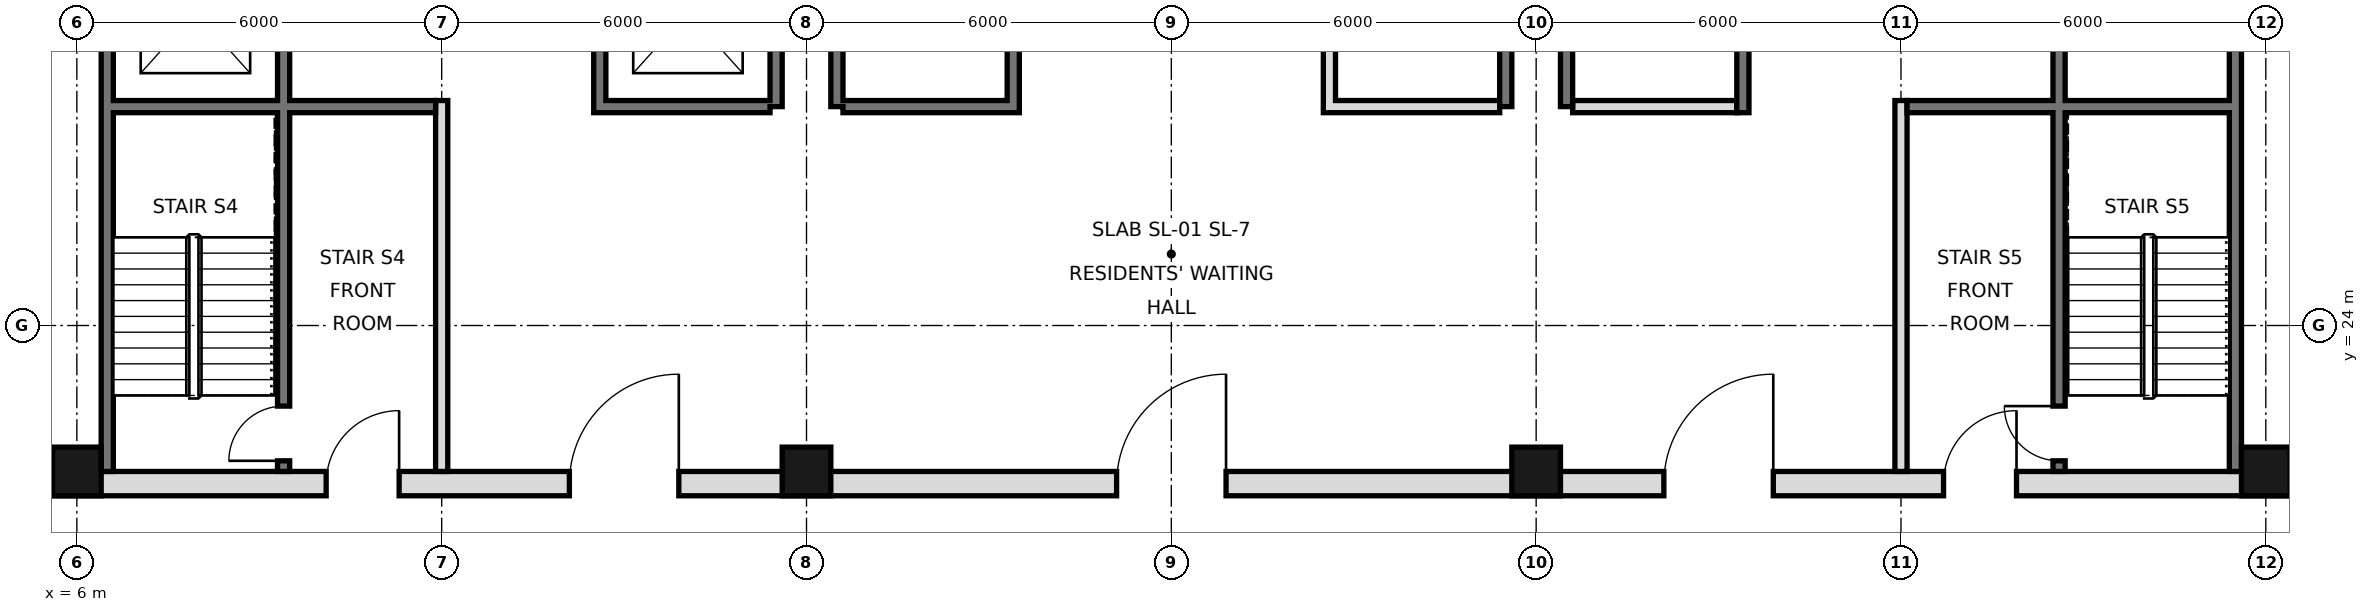
"""IFC4 building model, lengths in metres.
Left out: names, types, materials, properties, quantities, classifications, styles, units other than length and angle.
Written with IfcOpenShell. Run it as: python <this file> out.ifc"""

import sys

from ifc_helpers import new_model, si_unit, direction, frame, frame_2d, origin, origin_2d, place, context, subcontext, project, spatial, rectangle, hollow_rectangle, extrude, element, fill, save


model = new_model("IFC4")
c1 = context("Model", 3, precision=1e-05, world=origin(), true_north=direction((0.0, 1.0)))
c2 = subcontext(c1, "Body", "Model", "MODEL_VIEW")
j1 = project(units=[si_unit("LENGTHUNIT", "METRE"), si_unit("PLANEANGLEUNIT", "RADIAN")], contexts=[c1])
p1 = place(None, origin())
s1 = spatial("IfcSite", under=j1, at=p1, CompositionType="ELEMENT")
p2 = place(p1, origin())
s2 = spatial("IfcBuilding", under=s1, at=p2, CompositionType="ELEMENT")
p3 = place(p2, frame((0.0, 0.0, 110.6)))
s3 = spatial("IfcBuildingStorey", under=s2, at=p3, CompositionType="ELEMENT", Elevation=110.6)
for number, where, z_axis, x_axis in (
    (1, (6.0, 21.6, 0.0), (0.0, 0.0, 1.0), (1.0, 0.0, 0.0)),
    (2, (18.0, 21.6, 0.0), (0.0, 0.0, 1.0), (1.0, 0.0, 0.0)),
    (3, (30.0, 21.6, 0.0), (0.0, 0.0, 1.0), (1.0, 0.0, 0.0)),
    (4, (42.0, 21.6, 0.0), (0.0, 0.0, 1.0), (1.0, 0.0, 0.0)),
):
    element("IfcColumn", number, at=place(p3, frame(where, z_axis=z_axis, x_axis=x_axis)), inside=s3, PredefinedType="COLUMN", context=c2, shape_type="SweptSolid", body=[
        extrude(hollow_rectangle(XDim=0.8, YDim=0.8, WallThickness=0.05, at=origin_2d()), origin(), (0.0, 0.0, 1.0), 3.6),
    ])
for number, where, z_axis, x_axis in (
    (5, (6.5, 21.6, 0.0), (0.0, 0.0, 1.0), (0.0, 1.0, 0.0)),
    (6, (41.5, 21.6, 0.0), (0.0, 0.0, 1.0), (0.0, 1.0, 0.0)),
):
    element("IfcWall", number, at=place(p3, frame(where, z_axis=z_axis, x_axis=x_axis)), inside=s3, PredefinedType="SOLIDWALL", context=c2, shape_type="SweptSolid", body=[
        extrude(rectangle(XDim=23.5, YDim=0.2, at=frame_2d((11.75, 0.0))), origin(), (0.0, 0.0, 1.0), 3.38),
    ])
for number, where, z_axis, x_axis in (
    (7, (17.5, 27.6, 0.0), (0.0, 0.0, 1.0), (0.0, 1.0, 0.0)),
    (8, (18.5, 27.6, 0.0), (0.0, 0.0, 1.0), (0.0, 1.0, 0.0)),
    (9, (29.5, 27.6, 0.0), (0.0, 0.0, 1.0), (0.0, 1.0, 0.0)),
    (10, (30.5, 27.6, 0.0), (0.0, 0.0, 1.0), (0.0, 1.0, 0.0)),
):
    element("IfcWall", number, at=place(p3, frame(where, z_axis=z_axis, x_axis=x_axis)), inside=s3, PredefinedType="SOLIDWALL", context=c2, shape_type="SweptSolid", body=[
        extrude(rectangle(XDim=17.5, YDim=0.2, at=frame_2d((8.75, 0.0))), origin(), (0.0, 0.0, 1.0), 3.38),
    ])
p4 = place(p3, frame((5.6, 21.4, 0.0), z_axis=(0.0, 0.0, 1.0), x_axis=(1.0, 0.0, 0.0)))
e11 = element("IfcWall", 11, at=p4, inside=s3, PredefinedType="SOLIDWALL", context=c2, shape_type="SweptSolid", body=[
    extrude(rectangle(XDim=36.8, YDim=0.4, at=frame_2d((18.4, 0.0))), origin(), (0.0, 0.0, 1.0), 3.38),
])
p5 = place(p4, frame((8.5, 0.0, 0.0)))
e12 = element("IfcOpeningElement", 12, at=p5, cuts=e11, PredefinedType="OPENING", context=c2, shape_type="SweptSolid", body=[
    extrude(rectangle(XDim=1.8, YDim=2.1, at=frame_2d((0.9, 1.05))), frame((0.0, 0.21, 0.0), z_axis=(0.0, -1.0, 0.0), x_axis=(1.0, 0.0, 0.0)), (0.0, 0.0, 1.0), 0.42),
])
p6 = place(p4, frame((17.5, 0.0, 0.0)))
e13 = element("IfcOpeningElement", 13, at=p6, cuts=e11, PredefinedType="OPENING", context=c2, shape_type="SweptSolid", body=[
    extrude(rectangle(XDim=1.8, YDim=2.1, at=frame_2d((0.9, 1.05))), frame((0.0, 0.21, 0.0), z_axis=(0.0, -1.0, 0.0), x_axis=(1.0, 0.0, 0.0)), (0.0, 0.0, 1.0), 0.42),
])
p7 = place(p4, frame((26.5, 0.0, 0.0)))
e14 = element("IfcOpeningElement", 14, at=p7, cuts=e11, PredefinedType="OPENING", context=c2, shape_type="SweptSolid", body=[
    extrude(rectangle(XDim=1.8, YDim=2.1, at=frame_2d((0.9, 1.05))), frame((0.0, 0.21, 0.0), z_axis=(0.0, -1.0, 0.0), x_axis=(1.0, 0.0, 0.0)), (0.0, 0.0, 1.0), 0.42),
])
p8 = place(p4, frame((4.5, 0.0, 0.0)))
e15 = element("IfcOpeningElement", 15, at=p8, cuts=e11, PredefinedType="OPENING", context=c2, shape_type="SweptSolid", body=[
    extrude(rectangle(XDim=1.2, YDim=2.1, at=frame_2d((0.6, 1.05))), frame((0.0, 0.21, 0.0), z_axis=(0.0, -1.0, 0.0), x_axis=(1.0, 0.0, 0.0)), (0.0, 0.0, 1.0), 0.42),
])
p9 = place(p4, frame((31.1, 0.0, 0.0)))
e16 = element("IfcOpeningElement", 16, at=p9, cuts=e11, PredefinedType="OPENING", context=c2, shape_type="SweptSolid", body=[
    extrude(rectangle(XDim=1.2, YDim=2.1, at=frame_2d((0.6, 1.05))), frame((0.0, 0.21, 0.0), z_axis=(0.0, -1.0, 0.0), x_axis=(1.0, 0.0, 0.0)), (0.0, 0.0, 1.0), 0.42),
])
p10 = place(p3, frame((12.0, 21.6, 0.0), z_axis=(0.0, 0.0, 1.0), x_axis=(0.0, 1.0, 0.0)))
e17 = element("IfcWall", 17, at=p10, inside=s3, PredefinedType="PARTITIONING", context=c2, shape_type="SweptSolid", body=[
    extrude(rectangle(XDim=6.1, YDim=0.2, at=frame_2d((3.05, 0.0))), origin(), (0.0, 0.0, 1.0), 3.38),
])
p11 = place(p3, frame((14.6, 27.5, 0.0), z_axis=(0.0, 0.0, 1.0), x_axis=(0.0, 1.0, 0.0)))
e18 = element("IfcWall", 18, at=p11, inside=s3, PredefinedType="SOLIDWALL", context=c2, shape_type="SweptSolid", body=[
    extrude(rectangle(XDim=17.5, YDim=0.2, at=frame_2d((8.75, 0.0))), origin(), (0.0, 0.0, 1.0), 3.38),
])
p12 = place(p11, frame((1.1, 0.0, 0.0)))
e19 = element("IfcOpeningElement", 19, at=p12, cuts=e18, PredefinedType="OPENING", context=c2, shape_type="SweptSolid", body=[
    extrude(rectangle(XDim=1.1, YDim=2.1, at=frame_2d((0.55, 1.05))), frame((0.0, 0.11, 0.0), z_axis=(0.0, -1.0, 0.0), x_axis=(1.0, 0.0, 0.0)), (0.0, 0.0, 1.0), 0.22),
])
p13 = place(p11, frame((4.2, 0.0, 0.0)))
e20 = element("IfcOpeningElement", 20, at=p13, cuts=e18, PredefinedType="OPENING", context=c2, shape_type="SweptSolid", body=[
    extrude(rectangle(XDim=1.1, YDim=2.1, at=frame_2d((0.55, 1.05))), frame((0.0, 0.11, 0.0), z_axis=(0.0, -1.0, 0.0), x_axis=(1.0, 0.0, 0.0)), (0.0, 0.0, 1.0), 0.22),
])
p14 = place(p11, frame((15.4, 0.0, 0.0)))
e21 = element("IfcOpeningElement", 21, at=p14, cuts=e18, PredefinedType="OPENING", context=c2, shape_type="SweptSolid", body=[
    extrude(rectangle(XDim=1.1, YDim=2.1, at=frame_2d((0.55, 1.05))), frame((0.0, 0.11, 0.0), z_axis=(0.0, -1.0, 0.0), x_axis=(1.0, 0.0, 0.0)), (0.0, 0.0, 1.0), 0.22),
])
p15 = place(p11, frame((9.9, 0.0, 0.0)))
e22 = element("IfcOpeningElement", 22, at=p15, cuts=e18, PredefinedType="OPENING", context=c2, shape_type="SweptSolid", body=[
    extrude(rectangle(XDim=0.9, YDim=2.1, at=frame_2d((0.45, 1.05))), frame((0.0, 0.11, 0.0), z_axis=(0.0, -1.0, 0.0), x_axis=(1.0, 0.0, 0.0)), (0.0, 0.0, 1.0), 0.22),
])
p16 = place(p3, frame((21.4, 27.5, 0.0), z_axis=(0.0, 0.0, 1.0), x_axis=(0.0, 1.0, 0.0)))
e23 = element("IfcWall", 23, at=p16, inside=s3, PredefinedType="SOLIDWALL", context=c2, shape_type="SweptSolid", body=[
    extrude(rectangle(XDim=17.5, YDim=0.2, at=frame_2d((8.75, 0.0))), origin(), (0.0, 0.0, 1.0), 3.38),
])
p17 = place(p16, frame((16.2, 0.0, 0.0)))
e24 = element("IfcOpeningElement", 24, at=p17, cuts=e23, PredefinedType="OPENING", context=c2, shape_type="SweptSolid", body=[
    extrude(rectangle(XDim=1.0, YDim=2.1, at=frame_2d((0.5, 1.05))), frame((0.0, 0.11, 0.0), z_axis=(0.0, -1.0, 0.0), x_axis=(1.0, 0.0, 0.0)), (0.0, 0.0, 1.0), 0.22),
])
p18 = place(p16, frame((7.4, 0.0, 0.0)))
e25 = element("IfcOpeningElement", 25, at=p18, cuts=e23, PredefinedType="OPENING", context=c2, shape_type="SweptSolid", body=[
    extrude(rectangle(XDim=0.9, YDim=2.1, at=frame_2d((0.45, 1.05))), frame((0.0, 0.11, 0.0), z_axis=(0.0, -1.0, 0.0), x_axis=(1.0, 0.0, 0.0)), (0.0, 0.0, 1.0), 0.22),
])
p19 = place(p3, frame((26.6, 27.5, 0.0), z_axis=(0.0, 0.0, 1.0), x_axis=(0.0, 1.0, 0.0)))
e26 = element("IfcWall", 26, at=p19, inside=s3, PredefinedType="SOLIDWALL", context=c2, shape_type="SweptSolid", body=[
    extrude(rectangle(XDim=17.5, YDim=0.2, at=frame_2d((8.75, 0.0))), origin(), (0.0, 0.0, 1.0), 3.38),
])
p20 = place(p19, frame((4.3, 0.0, 0.0)))
e27 = element("IfcOpeningElement", 27, at=p20, cuts=e26, PredefinedType="OPENING", context=c2, shape_type="SweptSolid", body=[
    extrude(rectangle(XDim=0.9, YDim=2.1, at=frame_2d((0.45, 1.05))), frame((0.0, 0.11, 0.0), z_axis=(0.0, -1.0, 0.0), x_axis=(1.0, 0.0, 0.0)), (0.0, 0.0, 1.0), 0.22),
])
p21 = place(p19, frame((10.35, 0.0, 0.0)))
e28 = element("IfcOpeningElement", 28, at=p21, cuts=e26, PredefinedType="OPENING", context=c2, shape_type="SweptSolid", body=[
    extrude(rectangle(XDim=1.0, YDim=2.1, at=frame_2d((0.5, 1.05))), frame((0.0, 0.11, 0.0), z_axis=(0.0, -1.0, 0.0), x_axis=(1.0, 0.0, 0.0)), (0.0, 0.0, 1.0), 0.22),
])
p22 = place(p19, frame((14.575, 0.0, 0.0)))
e29 = element("IfcOpeningElement", 29, at=p22, cuts=e26, PredefinedType="OPENING", context=c2, shape_type="SweptSolid", body=[
    extrude(rectangle(XDim=1.0, YDim=2.1, at=frame_2d((0.5, 1.05))), frame((0.0, 0.11, 0.0), z_axis=(0.0, -1.0, 0.0), x_axis=(1.0, 0.0, 0.0)), (0.0, 0.0, 1.0), 0.22),
])
p23 = place(p3, frame((33.4, 27.5, 0.0), z_axis=(0.0, 0.0, 1.0), x_axis=(0.0, 1.0, 0.0)))
e30 = element("IfcWall", 30, at=p23, inside=s3, PredefinedType="SOLIDWALL", context=c2, shape_type="SweptSolid", body=[
    extrude(rectangle(XDim=17.5, YDim=0.2, at=frame_2d((8.75, 0.0))), origin(), (0.0, 0.0, 1.0), 3.38),
])
p24 = place(p23, frame((15.4, 0.0, 0.0)))
e31 = element("IfcOpeningElement", 31, at=p24, cuts=e30, PredefinedType="OPENING", context=c2, shape_type="SweptSolid", body=[
    extrude(rectangle(XDim=1.1, YDim=2.1, at=frame_2d((0.55, 1.05))), frame((0.0, 0.11, 0.0), z_axis=(0.0, -1.0, 0.0), x_axis=(1.0, 0.0, 0.0)), (0.0, 0.0, 1.0), 0.22),
])
p25 = place(p23, frame((2.7, 0.0, 0.0)))
e32 = element("IfcOpeningElement", 32, at=p25, cuts=e30, PredefinedType="OPENING", context=c2, shape_type="SweptSolid", body=[
    extrude(rectangle(XDim=1.0, YDim=2.1, at=frame_2d((0.5, 1.05))), frame((0.0, 0.11, 0.0), z_axis=(0.0, -1.0, 0.0), x_axis=(1.0, 0.0, 0.0)), (0.0, 0.0, 1.0), 0.22),
])
p26 = place(p23, frame((9.9, 0.0, 0.0)))
e33 = element("IfcOpeningElement", 33, at=p26, cuts=e30, PredefinedType="OPENING", context=c2, shape_type="SweptSolid", body=[
    extrude(rectangle(XDim=0.9, YDim=2.1, at=frame_2d((0.45, 1.05))), frame((0.0, 0.11, 0.0), z_axis=(0.0, -1.0, 0.0), x_axis=(1.0, 0.0, 0.0)), (0.0, 0.0, 1.0), 0.22),
])
p27 = place(p3, frame((36.0, 21.6, 0.0), z_axis=(0.0, 0.0, 1.0), x_axis=(0.0, 1.0, 0.0)))
e34 = element("IfcWall", 34, at=p27, inside=s3, PredefinedType="PARTITIONING", context=c2, shape_type="SweptSolid", body=[
    extrude(rectangle(XDim=6.1, YDim=0.2, at=frame_2d((3.05, 0.0))), origin(), (0.0, 0.0, 1.0), 3.38),
])
p28 = place(p3, frame((38.6, 21.6, 0.0), z_axis=(0.0, 0.0, 1.0), x_axis=(0.0, 1.0, 0.0)))
e35 = element("IfcWall", 35, at=p28, inside=s3, PredefinedType="SOLIDWALL", context=c2, shape_type="SweptSolid", body=[
    extrude(rectangle(XDim=23.4, YDim=0.2, at=frame_2d((11.7, 0.0))), origin(), (0.0, 0.0, 1.0), 3.38),
])
p29 = place(p28, frame((8.6, 0.0, 0.0)))
e36 = element("IfcOpeningElement", 36, at=p29, cuts=e35, PredefinedType="OPENING", context=c2, shape_type="SweptSolid", body=[
    extrude(rectangle(XDim=1.0, YDim=2.1, at=frame_2d((0.5, 1.05))), frame((0.0, 0.11, 0.0), z_axis=(0.0, -1.0, 0.0), x_axis=(1.0, 0.0, 0.0)), (0.0, 0.0, 1.0), 0.22),
])
p30 = place(p28, frame((13.25, 0.0, 0.0)))
e37 = element("IfcOpeningElement", 37, at=p30, cuts=e35, PredefinedType="OPENING", context=c2, shape_type="SweptSolid", body=[
    extrude(rectangle(XDim=1.0, YDim=2.1, at=frame_2d((0.5, 1.05))), frame((0.0, 0.11, 0.0), z_axis=(0.0, -1.0, 0.0), x_axis=(1.0, 0.0, 0.0)), (0.0, 0.0, 1.0), 0.22),
])
p31 = place(p28, frame((22.1, 0.0, 0.0)))
e38 = element("IfcOpeningElement", 38, at=p31, cuts=e35, PredefinedType="OPENING", context=c2, shape_type="SweptSolid", body=[
    extrude(rectangle(XDim=1.0, YDim=2.1, at=frame_2d((0.5, 1.05))), frame((0.0, 0.11, 0.0), z_axis=(0.0, -1.0, 0.0), x_axis=(1.0, 0.0, 0.0)), (0.0, 0.0, 1.0), 0.22),
])
p32 = place(p28, frame((0.175, 0.0, 0.0)))
e39 = element("IfcOpeningElement", 39, at=p32, cuts=e35, PredefinedType="OPENING", context=c2, shape_type="SweptSolid", body=[
    extrude(rectangle(XDim=0.9, YDim=2.1, at=frame_2d((0.45, 1.05))), frame((0.0, 0.11, 0.0), z_axis=(0.0, -1.0, 0.0), x_axis=(1.0, 0.0, 0.0)), (0.0, 0.0, 1.0), 0.22),
])
p33 = place(p3, frame((9.4, 21.6, 0.0), z_axis=(0.0, 0.0, 1.0), x_axis=(0.0, 1.0, 0.0)))
e40 = element("IfcWall", 40, at=p33, inside=s3, PredefinedType="SOLIDWALL", context=c2, shape_type="SweptSolid", body=[
    extrude(rectangle(XDim=23.4, YDim=0.2, at=frame_2d((11.7, 0.0))), origin(), (0.0, 0.0, 1.0), 3.38),
])
p34 = place(p33, frame((7.0, 0.0, 0.0)))
e41 = element("IfcOpeningElement", 41, at=p34, cuts=e40, PredefinedType="OPENING", context=c2, shape_type="SweptSolid", body=[
    extrude(rectangle(XDim=1.1, YDim=2.1, at=frame_2d((0.55, 1.05))), frame((0.0, 0.11, 0.0), z_axis=(0.0, -1.0, 0.0), x_axis=(1.0, 0.0, 0.0)), (0.0, 0.0, 1.0), 0.22),
])
p35 = place(p33, frame((10.1, 0.0, 0.0)))
e42 = element("IfcOpeningElement", 42, at=p35, cuts=e40, PredefinedType="OPENING", context=c2, shape_type="SweptSolid", body=[
    extrude(rectangle(XDim=1.1, YDim=2.1, at=frame_2d((0.55, 1.05))), frame((0.0, 0.11, 0.0), z_axis=(0.0, -1.0, 0.0), x_axis=(1.0, 0.0, 0.0)), (0.0, 0.0, 1.0), 0.22),
])
p36 = place(p33, frame((13.2, 0.0, 0.0)))
e43 = element("IfcOpeningElement", 43, at=p36, cuts=e40, PredefinedType="OPENING", context=c2, shape_type="SweptSolid", body=[
    extrude(rectangle(XDim=1.1, YDim=2.1, at=frame_2d((0.55, 1.05))), frame((0.0, 0.11, 0.0), z_axis=(0.0, -1.0, 0.0), x_axis=(1.0, 0.0, 0.0)), (0.0, 0.0, 1.0), 0.22),
])
p37 = place(p33, frame((22.1, 0.0, 0.0)))
e44 = element("IfcOpeningElement", 44, at=p37, cuts=e40, PredefinedType="OPENING", context=c2, shape_type="SweptSolid", body=[
    extrude(rectangle(XDim=1.0, YDim=2.1, at=frame_2d((0.5, 1.05))), frame((0.0, 0.11, 0.0), z_axis=(0.0, -1.0, 0.0), x_axis=(1.0, 0.0, 0.0)), (0.0, 0.0, 1.0), 0.22),
])
p38 = place(p33, frame((0.175, 0.0, 0.0)))
e45 = element("IfcOpeningElement", 45, at=p38, cuts=e40, PredefinedType="OPENING", context=c2, shape_type="SweptSolid", body=[
    extrude(rectangle(XDim=0.9, YDim=2.1, at=frame_2d((0.45, 1.05))), frame((0.0, 0.11, 0.0), z_axis=(0.0, -1.0, 0.0), x_axis=(1.0, 0.0, 0.0)), (0.0, 0.0, 1.0), 0.22),
])
for number, where, z_axis, x_axis in (
    (46, (14.7, 27.6, 0.0), (0.0, 0.0, 1.0), (1.0, 0.0, 0.0)),
    (47, (18.6, 27.6, 0.0), (0.0, 0.0, 1.0), (1.0, 0.0, 0.0)),
    (48, (26.7, 27.6, 0.0), (0.0, 0.0, 1.0), (1.0, 0.0, 0.0)),
):
    element("IfcWall", number, at=place(p3, frame(where, z_axis=z_axis, x_axis=x_axis)), inside=s3, PredefinedType="SOLIDWALL", context=c2, shape_type="SweptSolid", body=[
        extrude(rectangle(XDim=2.7, YDim=0.2, at=frame_2d((1.35, 0.0))), origin(), (0.0, 0.0, 1.0), 3.38),
    ])
p39 = place(p3, frame((30.6, 27.6, 0.0), z_axis=(0.0, 0.0, 1.0), x_axis=(1.0, 0.0, 0.0)))
e49 = element("IfcWall", 49, at=p39, inside=s3, PredefinedType="PARTITIONING", context=c2, shape_type="SweptSolid", body=[
    extrude(rectangle(XDim=2.7, YDim=0.2, at=frame_2d((1.35, 0.0))), origin(), (0.0, 0.0, 1.0), 3.38),
])
for number, where, z_axis, x_axis in (
    (50, (36.1, 27.6, 0.0), (0.0, 0.0, 1.0), (1.0, 0.0, 0.0)),
    (51, (6.6, 27.6, 0.0), (0.0, 0.0, 1.0), (1.0, 0.0, 0.0)),
):
    element("IfcWall", number, at=place(p3, frame(where, z_axis=z_axis, x_axis=x_axis)), inside=s3, PredefinedType="SOLIDWALL", context=c2, shape_type="SweptSolid", body=[
        extrude(rectangle(XDim=5.3, YDim=0.2, at=frame_2d((2.65, 0.0))), origin(), (0.0, 0.0, 1.0), 3.38),
    ])
p40 = place(p5, frame((1.8, 0.0, 0.0), z_axis=(0.0, 0.0, 1.0), x_axis=(-1.0, 0.0, 0.0)))
e52 = element("IfcDoor", 52, at=p40, inside=s3, OperationType="SINGLE_SWING_LEFT", PredefinedType="DOOR", context=c2, shape_type="SweptSolid", body=[
    extrude(rectangle(XDim=1.8, YDim=2.1, at=frame_2d((0.9, 1.05))), frame((0.0, 0.025, 0.0), z_axis=(0.0, -1.0, 0.0), x_axis=(1.0, 0.0, 0.0)), (0.0, 0.0, 1.0), 0.05),
])
fill(e12, e52)
p41 = place(p6, frame((1.8, 0.0, 0.0), z_axis=(0.0, 0.0, 1.0), x_axis=(-1.0, 0.0, 0.0)))
e53 = element("IfcDoor", 53, at=p41, inside=s3, OperationType="SINGLE_SWING_LEFT", PredefinedType="DOOR", context=c2, shape_type="SweptSolid", body=[
    extrude(rectangle(XDim=1.8, YDim=2.1, at=frame_2d((0.9, 1.05))), frame((0.0, 0.025, 0.0), z_axis=(0.0, -1.0, 0.0), x_axis=(1.0, 0.0, 0.0)), (0.0, 0.0, 1.0), 0.05),
])
fill(e13, e53)
p42 = place(p7, frame((1.8, 0.0, 0.0), z_axis=(0.0, 0.0, 1.0), x_axis=(-1.0, 0.0, 0.0)))
e54 = element("IfcDoor", 54, at=p42, inside=s3, OperationType="SINGLE_SWING_LEFT", PredefinedType="DOOR", context=c2, shape_type="SweptSolid", body=[
    extrude(rectangle(XDim=1.8, YDim=2.1, at=frame_2d((0.9, 1.05))), frame((0.0, 0.025, 0.0), z_axis=(0.0, -1.0, 0.0), x_axis=(1.0, 0.0, 0.0)), (0.0, 0.0, 1.0), 0.05),
])
fill(e14, e54)
p43 = place(p8, frame((1.2, 0.0, 0.0), z_axis=(0.0, 0.0, 1.0), x_axis=(-1.0, 0.0, 0.0)))
e55 = element("IfcDoor", 55, at=p43, inside=s3, OperationType="SINGLE_SWING_LEFT", PredefinedType="DOOR", context=c2, shape_type="SweptSolid", body=[
    extrude(rectangle(XDim=1.2, YDim=2.1, at=frame_2d((0.6, 1.05))), frame((0.0, 0.025, 0.0), z_axis=(0.0, -1.0, 0.0), x_axis=(1.0, 0.0, 0.0)), (0.0, 0.0, 1.0), 0.05),
])
fill(e15, e55)
p44 = place(p9, frame((1.2, 0.0, 0.0), z_axis=(0.0, 0.0, 1.0), x_axis=(-1.0, 0.0, 0.0)))
e56 = element("IfcDoor", 56, at=p44, inside=s3, OperationType="SINGLE_SWING_LEFT", PredefinedType="DOOR", context=c2, shape_type="SweptSolid", body=[
    extrude(rectangle(XDim=1.2, YDim=2.1, at=frame_2d((0.6, 1.05))), frame((0.0, 0.025, 0.0), z_axis=(0.0, -1.0, 0.0), x_axis=(1.0, 0.0, 0.0)), (0.0, 0.0, 1.0), 0.05),
])
fill(e16, e56)
p45 = place(p38, origin())
e57 = element("IfcDoor", 57, at=p45, inside=s3, OperationType="SINGLE_SWING_LEFT", PredefinedType="DOOR", context=c2, shape_type="SweptSolid", body=[
    extrude(rectangle(XDim=0.9, YDim=2.1, at=frame_2d((0.45, 1.05))), frame((0.0, 0.025, 0.0), z_axis=(0.0, -1.0, 0.0), x_axis=(1.0, 0.0, 0.0)), (0.0, 0.0, 1.0), 0.05),
])
fill(e45, e57)
p46 = place(p32, frame((0.9, 0.0, 0.0), z_axis=(0.0, 0.0, 1.0), x_axis=(-1.0, 0.0, 0.0)))
e58 = element("IfcDoor", 58, at=p46, inside=s3, OperationType="SINGLE_SWING_LEFT", PredefinedType="DOOR", context=c2, shape_type="SweptSolid", body=[
    extrude(rectangle(XDim=0.9, YDim=2.1, at=frame_2d((0.45, 1.05))), frame((0.0, 0.025, 0.0), z_axis=(0.0, -1.0, 0.0), x_axis=(1.0, 0.0, 0.0)), (0.0, 0.0, 1.0), 0.05),
])
fill(e39, e58)
save(model, sys.argv[1])
